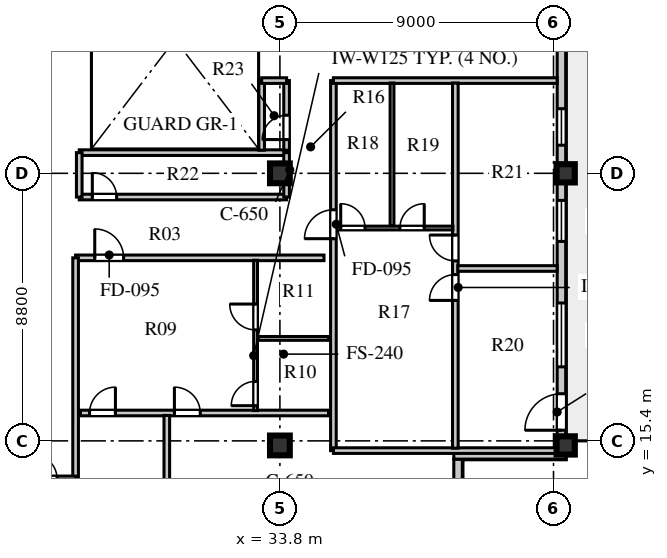
"""IFC4 building model, lengths in metres.
Left out: names, types, materials, properties, quantities, classifications, styles, units other than length and angle.
Written with IfcOpenShell. Run it as: python <this file> out.ifc"""

import sys

from ifc_helpers import new_model, si_unit, direction, frame, frame_2d, origin, origin_2d, place, context, subcontext, project, spatial, rectangle, extrude, element, fill, save


model = new_model("IFC4")
c1 = context("Model", 3, precision=1e-05, world=origin(), true_north=direction((0.0, 1.0)))
c2 = subcontext(c1, "Body", "Model", "MODEL_VIEW")
j1 = project(units=[si_unit("LENGTHUNIT", "METRE"), si_unit("PLANEANGLEUNIT", "RADIAN")], contexts=[c1])
p1 = place(None, origin())
s1 = spatial("IfcSite", under=j1, at=p1, CompositionType="ELEMENT")
p2 = place(p1, origin())
s2 = spatial("IfcBuilding", under=s1, at=p2, CompositionType="ELEMENT")
p3 = place(p2, frame((0.0, 0.0, 335.3)))
s3 = spatial("IfcBuildingStorey", under=s2, at=p3, CompositionType="ELEMENT", Elevation=335.3)
for number, where, z_axis, x_axis in (
    (1, (33.8, 15.25, 0.0), (0.0, 0.0, 1.0), (1.0, 0.0, 0.0)),
    (2, (33.8, 24.2, 0.0), (0.0, 0.0, 1.0), (1.0, 0.0, 0.0)),
):
    element("IfcColumn", number, at=place(p3, frame(where, z_axis=z_axis, x_axis=x_axis)), inside=s3, PredefinedType="COLUMN", context=c2, shape_type="SweptSolid", body=[
        extrude(rectangle(XDim=0.65, YDim=0.65, at=origin_2d()), origin(), (0.0, 0.0, 1.0), 3.56),
    ])
for number, where, z_axis, x_axis in (
    (3, (43.2, 15.25, 0.0), (0.0, 0.0, 1.0), (1.0, 0.0, 0.0)),
    (4, (43.2, 24.2, 0.0), (0.0, 0.0, 1.0), (1.0, 0.0, 0.0)),
):
    element("IfcColumn", number, at=place(p3, frame(where, z_axis=z_axis, x_axis=x_axis)), inside=s3, PredefinedType="COLUMN", context=c2, shape_type="SweptSolid", body=[
        extrude(rectangle(XDim=0.6, YDim=0.6, at=origin_2d()), origin(), (0.0, 0.0, 1.0), 3.56),
    ])
p4 = place(p3, frame((39.66, 11.68, 0.0), z_axis=(0.0, 0.0, 1.0), x_axis=(0.0, 1.0, 0.0)))
e5 = element("IfcWall", 5, at=p4, inside=s3, PredefinedType="STANDARD", context=c2, shape_type="SweptSolid", body=[
    extrude(rectangle(XDim=3.12, YDim=0.28, at=frame_2d((1.56, 0.0))), origin(), (0.0, 0.0, 1.0), 2.92),
])
p5 = place(p3, frame((39.52, 14.94, 0.0), z_axis=(0.0, 0.0, 1.0), x_axis=(1.0, 0.0, 0.0)))
e6 = element("IfcWall", 6, at=p5, inside=s3, PredefinedType="STANDARD", context=c2, shape_type="SweptSolid", body=[
    extrude(rectangle(XDim=3.68, YDim=0.28, at=frame_2d((1.84, 0.0))), origin(), (0.0, 0.0, 1.0), 2.92),
])
p6 = place(p3, frame((43.06, 15.08, 0.0), z_axis=(0.0, 0.0, 1.0), x_axis=(0.0, 1.0, 0.0)))
e7 = element("IfcWall", 7, at=p6, inside=s3, PredefinedType="STANDARD", context=c2, shape_type="SweptSolid", body=[
    extrude(rectangle(XDim=27.04, YDim=0.28, at=frame_2d((13.52, 0.0))), origin(), (0.0, 0.0, 1.0), 2.92),
])
p7 = place(p6, frame((0.67, 0.0, 0.0)))
e8 = element("IfcOpeningElement", 8, at=p7, cuts=e7, PredefinedType="OPENING", context=c2, shape_type="SweptSolid", body=[
    extrude(rectangle(XDim=1.2, YDim=2.05, at=frame_2d((0.6, 1.025))), frame((0.0, 0.15, 0.0), z_axis=(0.0, -1.0, 0.0), x_axis=(1.0, 0.0, 0.0)), (0.0, 0.0, 1.0), 0.3),
])
p8 = place(p6, frame((2.755, 0.0, 0.8)))
e9 = element("IfcOpeningElement", 9, at=p8, cuts=e7, PredefinedType="OPENING", context=c2, shape_type="SweptSolid", body=[
    extrude(rectangle(XDim=2.1, YDim=1.95, at=frame_2d((1.05, 0.975))), frame((0.0, 0.15, 0.0), z_axis=(0.0, -1.0, 0.0), x_axis=(1.0, 0.0, 0.0)), (0.0, 0.0, 1.0), 0.3),
])
p9 = place(p6, frame((6.88, 0.0, 0.8)))
e10 = element("IfcOpeningElement", 10, at=p9, cuts=e7, PredefinedType="OPENING", context=c2, shape_type="SweptSolid", body=[
    extrude(rectangle(XDim=1.35, YDim=1.9, at=frame_2d((0.675, 0.95))), frame((0.0, 0.15, 0.0), z_axis=(0.0, -1.0, 0.0), x_axis=(1.0, 0.0, 0.0)), (0.0, 0.0, 1.0), 0.3),
])
p10 = place(p6, frame((10.045, 0.0, 0.8)))
e11 = element("IfcOpeningElement", 11, at=p10, cuts=e7, PredefinedType="OPENING", context=c2, shape_type="SweptSolid", body=[
    extrude(rectangle(XDim=1.2, YDim=1.75, at=frame_2d((0.6, 0.875))), frame((0.0, 0.15, 0.0), z_axis=(0.0, -1.0, 0.0), x_axis=(1.0, 0.0, 0.0)), (0.0, 0.0, 1.0), 0.3),
])
p11 = place(p6, frame((14.875, 0.0, 0.8)))
e12 = element("IfcOpeningElement", 12, at=p11, cuts=e7, PredefinedType="OPENING", context=c2, shape_type="SweptSolid", body=[
    extrude(rectangle(XDim=1.95, YDim=2.0, at=frame_2d((0.975, 1.0))), frame((0.0, 0.15, 0.0), z_axis=(0.0, -1.0, 0.0), x_axis=(1.0, 0.0, 0.0)), (0.0, 0.0, 1.0), 0.3),
])
p12 = place(p6, frame((21.42, 0.0, 0.8)))
e13 = element("IfcOpeningElement", 13, at=p12, cuts=e7, PredefinedType="OPENING", context=c2, shape_type="SweptSolid", body=[
    extrude(rectangle(XDim=2.25, YDim=2.0, at=frame_2d((1.125, 1.0))), frame((0.0, 0.15, 0.0), z_axis=(0.0, -1.0, 0.0), x_axis=(1.0, 0.0, 0.0)), (0.0, 0.0, 1.0), 0.3),
])
p13 = place(p3, frame((27.08, 21.42, 0.0), z_axis=(0.0, 0.0, 1.0), x_axis=(1.0, 0.0, 0.0)))
e14 = element("IfcWall", 14, at=p13, inside=s3, PredefinedType="SOLIDWALL", context=c2, shape_type="SweptSolid", body=[
    extrude(rectangle(XDim=8.17, YDim=0.185, at=frame_2d((4.085, 0.0))), origin(), (0.0, 0.0, 1.0), 3.26),
])
p14 = place(p13, frame((0.63, 0.0, 0.0)))
e15 = element("IfcOpeningElement", 15, at=p14, cuts=e14, PredefinedType="OPENING", context=c2, shape_type="SweptSolid", body=[
    extrude(rectangle(XDim=0.95, YDim=2.1, at=frame_2d((0.475, 1.05))), frame((0.0, 0.103, 0.0), z_axis=(0.0, -1.0, 0.0), x_axis=(1.0, 0.0, 0.0)), (0.0, 0.0, 1.0), 0.205),
])
p15 = place(p3, frame((27.08, 11.68, 0.0), z_axis=(0.0, 0.0, 1.0), x_axis=(0.0, 1.0, 0.0)))
e16 = element("IfcWall", 16, at=p15, inside=s3, PredefinedType="SOLIDWALL", context=c2, shape_type="SweptSolid", body=[
    extrude(rectangle(XDim=9.74, YDim=0.185, at=frame_2d((4.87, 0.0))), origin(), (0.0, 0.0, 1.0), 3.56),
])
p16 = place(p3, frame((27.24, 16.317, 0.0), z_axis=(0.0, 0.0, 1.0), x_axis=(1.0, 0.0, 0.0)))
e17 = element("IfcWall", 17, at=p16, inside=s3, PredefinedType="SOLIDWALL", context=c2, shape_type="SweptSolid", body=[
    extrude(rectangle(XDim=8.16, YDim=0.185, at=frame_2d((4.08, 0.0))), origin(), (0.0, 0.0, 1.0), 3.56),
])
p17 = place(p16, frame((0.3, 0.0, 0.0)))
e18 = element("IfcOpeningElement", 18, at=p17, cuts=e17, PredefinedType="OPENING", context=c2, shape_type="SweptSolid", body=[
    extrude(rectangle(XDim=0.85, YDim=2.08, at=frame_2d((0.425, 1.04))), frame((0.0, 0.103, 0.0), z_axis=(0.0, -1.0, 0.0), x_axis=(1.0, 0.0, 0.0)), (0.0, 0.0, 1.0), 0.205),
])
p18 = place(p16, frame((3.09, 0.0, 0.0)))
e19 = element("IfcOpeningElement", 19, at=p18, cuts=e17, PredefinedType="OPENING", context=c2, shape_type="SweptSolid", body=[
    extrude(rectangle(XDim=0.85, YDim=2.08, at=frame_2d((0.425, 1.04))), frame((0.0, 0.103, 0.0), z_axis=(0.0, -1.0, 0.0), x_axis=(1.0, 0.0, 0.0)), (0.0, 0.0, 1.0), 0.205),
])
p19 = place(p3, frame((33.0, 16.397, 0.0), z_axis=(0.0, 0.0, 1.0), x_axis=(0.0, 1.0, 0.0)))
e20 = element("IfcWall", 20, at=p19, inside=s3, PredefinedType="PLUMBINGWALL", context=c2, shape_type="SweptSolid", body=[
    extrude(rectangle(XDim=4.943, YDim=0.125, at=frame_2d((2.472, 0.0))), origin(), (0.0, 0.0, 1.0), 3.56),
])
p20 = place(p19, frame((0.16, 0.0, 0.0)))
e21 = element("IfcOpeningElement", 21, at=p20, cuts=e20, PredefinedType="OPENING", context=c2, shape_type="SweptSolid", body=[
    extrude(rectangle(XDim=0.8, YDim=2.05, at=frame_2d((0.4, 1.025))), frame((0.0, 0.073, 0.0), z_axis=(0.0, -1.0, 0.0), x_axis=(1.0, 0.0, 0.0)), (0.0, 0.0, 1.0), 0.145),
])
p21 = place(p19, frame((2.653, 0.0, 0.0)))
e22 = element("IfcOpeningElement", 22, at=p21, cuts=e20, PredefinedType="OPENING", context=c2, shape_type="SweptSolid", body=[
    extrude(rectangle(XDim=0.85, YDim=2.08, at=frame_2d((0.425, 1.04))), frame((0.0, 0.073, 0.0), z_axis=(0.0, -1.0, 0.0), x_axis=(1.0, 0.0, 0.0)), (0.0, 0.0, 1.0), 0.145),
])
p22 = place(p3, frame((33.08, 18.77, 0.0), z_axis=(0.0, 0.0, 1.0), x_axis=(1.0, 0.0, 0.0)))
e23 = element("IfcWall", 23, at=p22, inside=s3, PredefinedType="PLUMBINGWALL", context=c2, shape_type="SweptSolid", body=[
    extrude(rectangle(XDim=2.32, YDim=0.125, at=frame_2d((1.16, 0.0))), origin(), (0.0, 0.0, 1.0), 3.56),
])
p23 = place(p3, frame((30.08, 11.68, 0.0), z_axis=(0.0, 0.0, 1.0), x_axis=(0.0, 1.0, 0.0)))
e24 = element("IfcWall", 24, at=p23, inside=s3, PredefinedType="SOLIDWALL", context=c2, shape_type="SweptSolid", body=[
    extrude(rectangle(XDim=4.557, YDim=0.185, at=frame_2d((2.279, 0.0))), origin(), (0.0, 0.0, 1.0), 3.56),
])
p24 = place(p3, frame((35.56, 15.08, 0.0), z_axis=(0.0, 0.0, 1.0), x_axis=(0.0, 1.0, 0.0)))
e25 = element("IfcWall", 25, at=p24, inside=s3, PredefinedType="SOLIDWALL", context=c2, shape_type="SweptSolid", body=[
    extrude(rectangle(XDim=12.17, YDim=0.185, at=frame_2d((6.085, 0.0))), origin(), (0.0, 0.0, 1.0), 3.56),
])
p25 = place(p24, frame((6.97, 0.0, 0.0)))
e26 = element("IfcOpeningElement", 26, at=p25, cuts=e25, PredefinedType="OPENING", context=c2, shape_type="SweptSolid", body=[
    extrude(rectangle(XDim=0.95, YDim=2.1, at=frame_2d((0.475, 1.05))), frame((0.0, 0.103, 0.0), z_axis=(0.0, -1.0, 0.0), x_axis=(1.0, 0.0, 0.0)), (0.0, 0.0, 1.0), 0.205),
])
p26 = place(p3, frame((35.56, 15.08, 0.0), z_axis=(0.0, 0.0, 1.0), x_axis=(1.0, 0.0, 0.0)))
e27 = element("IfcWall", 27, at=p26, inside=s3, PredefinedType="SOLIDWALL", context=c2, shape_type="SweptSolid", body=[
    extrude(rectangle(XDim=7.36, YDim=0.185, at=frame_2d((3.68, 0.0))), origin(), (0.0, 0.0, 1.0), 3.11),
])
p27 = place(p3, frame((35.56, 27.25, 0.0), z_axis=(0.0, 0.0, 1.0), x_axis=(1.0, 0.0, 0.0)))
e28 = element("IfcWall", 28, at=p27, inside=s3, PredefinedType="SOLIDWALL", context=c2, shape_type="SweptSolid", body=[
    extrude(rectangle(XDim=7.36, YDim=0.185, at=frame_2d((3.68, 0.0))), origin(), (0.0, 0.0, 1.0), 3.56),
])
p28 = place(p3, frame((39.571, 15.16, 0.0), z_axis=(0.0, 0.0, 1.0), x_axis=(0.0, 1.0, 0.0)))
e29 = element("IfcWall", 29, at=p28, inside=s3, PredefinedType="SOLIDWALL", context=c2, shape_type="SweptSolid", body=[
    extrude(rectangle(XDim=12.01, YDim=0.185, at=frame_2d((6.005, 0.0))), origin(), (0.0, 0.0, 1.0), 3.56),
])
p29 = place(p28, frame((4.86, 0.0, 0.0)))
e30 = element("IfcOpeningElement", 30, at=p29, cuts=e29, PredefinedType="OPENING", context=c2, shape_type="SweptSolid", body=[
    extrude(rectangle(XDim=0.85, YDim=2.08, at=frame_2d((0.425, 1.04))), frame((0.0, 0.103, 0.0), z_axis=(0.0, -1.0, 0.0), x_axis=(1.0, 0.0, 0.0)), (0.0, 0.0, 1.0), 0.205),
])
p30 = place(p28, frame((6.16, 0.0, 0.0)))
e31 = element("IfcOpeningElement", 31, at=p30, cuts=e29, PredefinedType="OPENING", context=c2, shape_type="SweptSolid", body=[
    extrude(rectangle(XDim=0.85, YDim=2.08, at=frame_2d((0.425, 1.04))), frame((0.0, 0.103, 0.0), z_axis=(0.0, -1.0, 0.0), x_axis=(1.0, 0.0, 0.0)), (0.0, 0.0, 1.0), 0.205),
])
p31 = place(p3, frame((35.64, 22.4, 0.0), z_axis=(0.0, 0.0, 1.0), x_axis=(1.0, 0.0, 0.0)))
e32 = element("IfcWall", 32, at=p31, inside=s3, PredefinedType="PLUMBINGWALL", context=c2, shape_type="SweptSolid", body=[
    extrude(rectangle(XDim=3.851, YDim=0.125, at=frame_2d((1.926, 0.0))), origin(), (0.0, 0.0, 1.0), 3.56),
])
p32 = place(p31, frame((0.16, 0.0, 0.0)))
e33 = element("IfcOpeningElement", 33, at=p32, cuts=e32, PredefinedType="OPENING", context=c2, shape_type="SweptSolid", body=[
    extrude(rectangle(XDim=0.8, YDim=2.05, at=frame_2d((0.4, 1.025))), frame((0.0, 0.073, 0.0), z_axis=(0.0, -1.0, 0.0), x_axis=(1.0, 0.0, 0.0)), (0.0, 0.0, 1.0), 0.145),
])
p33 = place(p31, frame((2.108, 0.0, 0.0)))
e34 = element("IfcOpeningElement", 34, at=p33, cuts=e32, PredefinedType="OPENING", context=c2, shape_type="SweptSolid", body=[
    extrude(rectangle(XDim=0.8, YDim=2.05, at=frame_2d((0.4, 1.025))), frame((0.0, 0.073, 0.0), z_axis=(0.0, -1.0, 0.0), x_axis=(1.0, 0.0, 0.0)), (0.0, 0.0, 1.0), 0.145),
])
p34 = place(p3, frame((37.488, 22.48, 0.0), z_axis=(0.0, 0.0, 1.0), x_axis=(0.0, 1.0, 0.0)))
e35 = element("IfcWall", 35, at=p34, inside=s3, PredefinedType="PLUMBINGWALL", context=c2, shape_type="SweptSolid", body=[
    extrude(rectangle(XDim=4.69, YDim=0.125, at=frame_2d((2.345, 0.0))), origin(), (0.0, 0.0, 1.0), 3.56),
])
p35 = place(p3, frame((39.651, 21.07, 0.0), z_axis=(0.0, 0.0, 1.0), x_axis=(1.0, 0.0, 0.0)))
e36 = element("IfcWall", 36, at=p35, inside=s3, PredefinedType="SOLIDWALL", context=c2, shape_type="SweptSolid", body=[
    extrude(rectangle(XDim=3.269, YDim=0.185, at=frame_2d((1.635, 0.0))), origin(), (0.0, 0.0, 1.0), 3.56),
])
p36 = place(p3, frame((27.2, 23.42, 0.0), z_axis=(0.0, 0.0, 1.0), x_axis=(1.0, 0.0, 0.0)))
e37 = element("IfcWall", 37, at=p36, inside=s3, PredefinedType="SOLIDWALL", context=c2, shape_type="SweptSolid", body=[
    extrude(rectangle(XDim=6.82, YDim=0.185, at=frame_2d((3.41, 0.0))), origin(), (0.0, 0.0, 1.0), 3.56),
])
p37 = place(p36, frame((0.43, 0.0, 0.0)))
e38 = element("IfcOpeningElement", 38, at=p37, cuts=e37, PredefinedType="OPENING", context=c2, shape_type="SweptSolid", body=[
    extrude(rectangle(XDim=0.8, YDim=2.05, at=frame_2d((0.4, 1.025))), frame((0.0, 0.103, 0.0), z_axis=(0.0, -1.0, 0.0), x_axis=(1.0, 0.0, 0.0)), (0.0, 0.0, 1.0), 0.205),
])
p38 = place(p3, frame((27.2, 24.88, 0.0), z_axis=(0.0, 0.0, 1.0), x_axis=(1.0, 0.0, 0.0)))
e39 = element("IfcWall", 39, at=p38, inside=s3, PredefinedType="SOLIDWALL", context=c2, shape_type="SweptSolid", body=[
    extrude(rectangle(XDim=6.82, YDim=0.185, at=frame_2d((3.41, 0.0))), origin(), (0.0, 0.0, 1.0), 3.01),
])
p39 = place(p3, frame((27.2, 23.42, 0.0), z_axis=(0.0, 0.0, 1.0), x_axis=(0.0, 1.0, 0.0)))
e40 = element("IfcWall", 40, at=p39, inside=s3, PredefinedType="SOLIDWALL", context=c2, shape_type="SweptSolid", body=[
    extrude(rectangle(XDim=1.46, YDim=0.185, at=frame_2d((0.73, 0.0))), origin(), (0.0, 0.0, 1.0), 3.56),
])
p40 = place(p3, frame((34.02, 23.42, 0.0), z_axis=(0.0, 0.0, 1.0), x_axis=(0.0, 1.0, 0.0)))
e41 = element("IfcWall", 41, at=p40, inside=s3, PredefinedType="SOLIDWALL", context=c2, shape_type="SweptSolid", body=[
    extrude(rectangle(XDim=1.46, YDim=0.185, at=frame_2d((0.73, 0.0))), origin(), (0.0, 0.0, 1.0), 2.96),
])
p41 = place(p3, frame((33.2, 24.96, 0.0), z_axis=(0.0, 0.0, 1.0), x_axis=(0.0, 1.0, 0.0)))
e42 = element("IfcWall", 42, at=p41, inside=s3, PredefinedType="SOLIDWALL", context=c2, shape_type="SweptSolid", body=[
    extrude(rectangle(XDim=2.29, YDim=0.185, at=frame_2d((1.145, 0.0))), origin(), (0.0, 0.0, 1.0), 3.01),
])
p42 = place(p3, frame((34.02, 24.96, 0.0), z_axis=(0.0, 0.0, 1.0), x_axis=(0.0, 1.0, 0.0)))
e43 = element("IfcWall", 43, at=p42, inside=s3, PredefinedType="SOLIDWALL", context=c2, shape_type="SweptSolid", body=[
    extrude(rectangle(XDim=2.29, YDim=0.185, at=frame_2d((1.145, 0.0))), origin(), (0.0, 0.0, 1.0), 2.96),
])
p43 = place(p42, frame((0.35, 0.0, 0.0)))
e44 = element("IfcOpeningElement", 44, at=p43, cuts=e43, PredefinedType="OPENING", context=c2, shape_type="SweptSolid", body=[
    extrude(rectangle(XDim=0.8, YDim=2.05, at=frame_2d((0.4, 1.025))), frame((0.0, 0.103, 0.0), z_axis=(0.0, -1.0, 0.0), x_axis=(1.0, 0.0, 0.0)), (0.0, 0.0, 1.0), 0.205),
])
p44 = place(p3, frame((33.2, 27.25, 0.0), z_axis=(0.0, 0.0, 1.0), x_axis=(1.0, 0.0, 0.0)))
e45 = element("IfcWall", 45, at=p44, inside=s3, PredefinedType="SOLIDWALL", context=c2, shape_type="SweptSolid", body=[
    extrude(rectangle(XDim=0.82, YDim=0.185, at=frame_2d((0.41, 0.0))), origin(), (0.0, 0.0, 1.0), 3.56),
])
p45 = place(p3, frame((25.22, 14.15, 0.0), z_axis=(0.0, 0.0, 1.0), x_axis=(1.0, 0.0, 0.0)))
e46 = element("IfcWall", 46, at=p45, inside=s3, PredefinedType="SOLIDWALL", context=c2, shape_type="SweptSolid", body=[
    extrude(rectangle(XDim=1.86, YDim=0.185, at=frame_2d((0.93, 0.0))), origin(), (0.0, 0.0, 1.0), 3.56),
])
p46 = place(p45, frame((0.45, 0.0, 0.0)))
e47 = element("IfcOpeningElement", 47, at=p46, cuts=e46, PredefinedType="OPENING", context=c2, shape_type="SweptSolid", body=[
    extrude(rectangle(XDim=0.8, YDim=2.05, at=frame_2d((0.4, 1.025))), frame((0.0, 0.103, 0.0), z_axis=(0.0, -1.0, 0.0), x_axis=(1.0, 0.0, 0.0)), (0.0, 0.0, 1.0), 0.205),
])
p47 = place(p7, frame((1.2, 0.0, 0.0), z_axis=(0.0, 0.0, 1.0), x_axis=(-1.0, 0.0, 0.0)))
e48 = element("IfcDoor", 48, at=p47, inside=s3, OperationType="SINGLE_SWING_RIGHT", PredefinedType="DOOR", context=c2, shape_type="SweptSolid", body=[
    extrude(rectangle(XDim=1.2, YDim=2.05, at=frame_2d((0.6, 1.025))), frame((0.0, 0.025, 0.0), z_axis=(0.0, -1.0, 0.0), x_axis=(1.0, 0.0, 0.0)), (0.0, 0.0, 1.0), 0.05),
])
fill(e8, e48)
p48 = place(p8, origin())
e49 = element("IfcWindow", 49, at=p48, inside=s3, PartitioningType="SINGLE_PANEL", PredefinedType="WINDOW", context=c2, shape_type="SweptSolid", body=[
    extrude(rectangle(XDim=2.1, YDim=1.95, at=frame_2d((1.05, 0.975))), frame((0.0, 0.03, 0.0), z_axis=(0.0, -1.0, 0.0), x_axis=(1.0, 0.0, 0.0)), (0.0, 0.0, 1.0), 0.06),
])
fill(e9, e49)
p49 = place(p9, origin())
e50 = element("IfcWindow", 50, at=p49, inside=s3, PartitioningType="SINGLE_PANEL", PredefinedType="WINDOW", context=c2, shape_type="SweptSolid", body=[
    extrude(rectangle(XDim=1.35, YDim=1.9, at=frame_2d((0.675, 0.95))), frame((0.0, 0.03, 0.0), z_axis=(0.0, -1.0, 0.0), x_axis=(1.0, 0.0, 0.0)), (0.0, 0.0, 1.0), 0.06),
])
fill(e10, e50)
p50 = place(p10, origin())
e51 = element("IfcWindow", 51, at=p50, inside=s3, PartitioningType="SINGLE_PANEL", PredefinedType="WINDOW", context=c2, shape_type="SweptSolid", body=[
    extrude(rectangle(XDim=1.2, YDim=1.75, at=frame_2d((0.6, 0.875))), frame((0.0, 0.03, 0.0), z_axis=(0.0, -1.0, 0.0), x_axis=(1.0, 0.0, 0.0)), (0.0, 0.0, 1.0), 0.06),
])
fill(e11, e51)
p51 = place(p20, origin())
e52 = element("IfcDoor", 52, at=p51, inside=s3, OperationType="SINGLE_SWING_LEFT", PredefinedType="DOOR", context=c2, shape_type="SweptSolid", body=[
    extrude(rectangle(XDim=0.8, YDim=2.05, at=frame_2d((0.4, 1.025))), frame((0.0, 0.025, 0.0), z_axis=(0.0, -1.0, 0.0), x_axis=(1.0, 0.0, 0.0)), (0.0, 0.0, 1.0), 0.05),
])
fill(e21, e52)
p52 = place(p21, origin())
e53 = element("IfcDoor", 53, at=p52, inside=s3, OperationType="SINGLE_SWING_RIGHT", PredefinedType="DOOR", context=c2, shape_type="SweptSolid", body=[
    extrude(rectangle(XDim=0.85, YDim=2.08, at=frame_2d((0.425, 1.04))), frame((0.0, 0.025, 0.0), z_axis=(0.0, -1.0, 0.0), x_axis=(1.0, 0.0, 0.0)), (0.0, 0.0, 1.0), 0.05),
])
fill(e22, e53)
p53 = place(p17, frame((0.85, 0.0, 0.0), z_axis=(0.0, 0.0, 1.0), x_axis=(-1.0, 0.0, 0.0)))
e54 = element("IfcDoor", 54, at=p53, inside=s3, OperationType="SINGLE_SWING_LEFT", PredefinedType="DOOR", context=c2, shape_type="SweptSolid", body=[
    extrude(rectangle(XDim=0.85, YDim=2.08, at=frame_2d((0.425, 1.04))), frame((0.0, 0.025, 0.0), z_axis=(0.0, -1.0, 0.0), x_axis=(1.0, 0.0, 0.0)), (0.0, 0.0, 1.0), 0.05),
])
fill(e18, e54)
p54 = place(p18, frame((0.85, 0.0, 0.0), z_axis=(0.0, 0.0, 1.0), x_axis=(-1.0, 0.0, 0.0)))
e55 = element("IfcDoor", 55, at=p54, inside=s3, OperationType="SINGLE_SWING_RIGHT", PredefinedType="DOOR", context=c2, shape_type="SweptSolid", body=[
    extrude(rectangle(XDim=0.85, YDim=2.08, at=frame_2d((0.425, 1.04))), frame((0.0, 0.025, 0.0), z_axis=(0.0, -1.0, 0.0), x_axis=(1.0, 0.0, 0.0)), (0.0, 0.0, 1.0), 0.05),
])
fill(e19, e55)
p55 = place(p14, frame((0.95, 0.0, 0.0), z_axis=(0.0, 0.0, 1.0), x_axis=(-1.0, 0.0, 0.0)))
e56 = element("IfcDoor", 56, at=p55, inside=s3, OperationType="SINGLE_SWING_RIGHT", PredefinedType="DOOR", context=c2, shape_type="SweptSolid", body=[
    extrude(rectangle(XDim=0.95, YDim=2.1, at=frame_2d((0.475, 1.05))), frame((0.0, 0.025, 0.0), z_axis=(0.0, -1.0, 0.0), x_axis=(1.0, 0.0, 0.0)), (0.0, 0.0, 1.0), 0.05),
])
fill(e15, e56)
p56 = place(p32, origin())
e57 = element("IfcDoor", 57, at=p56, inside=s3, OperationType="SINGLE_SWING_LEFT", PredefinedType="DOOR", context=c2, shape_type="SweptSolid", body=[
    extrude(rectangle(XDim=0.8, YDim=2.05, at=frame_2d((0.4, 1.025))), frame((0.0, 0.025, 0.0), z_axis=(0.0, -1.0, 0.0), x_axis=(1.0, 0.0, 0.0)), (0.0, 0.0, 1.0), 0.05),
])
fill(e33, e57)
p57 = place(p33, origin())
e58 = element("IfcDoor", 58, at=p57, inside=s3, OperationType="SINGLE_SWING_RIGHT", PredefinedType="DOOR", context=c2, shape_type="SweptSolid", body=[
    extrude(rectangle(XDim=0.8, YDim=2.05, at=frame_2d((0.4, 1.025))), frame((0.0, 0.025, 0.0), z_axis=(0.0, -1.0, 0.0), x_axis=(1.0, 0.0, 0.0)), (0.0, 0.0, 1.0), 0.05),
])
fill(e34, e58)
p58 = place(p29, origin())
e59 = element("IfcDoor", 59, at=p58, inside=s3, OperationType="SINGLE_SWING_LEFT", PredefinedType="DOOR", context=c2, shape_type="SweptSolid", body=[
    extrude(rectangle(XDim=0.85, YDim=2.08, at=frame_2d((0.425, 1.04))), frame((0.0, 0.025, 0.0), z_axis=(0.0, -1.0, 0.0), x_axis=(1.0, 0.0, 0.0)), (0.0, 0.0, 1.0), 0.05),
])
fill(e30, e59)
p59 = place(p30, origin())
e60 = element("IfcDoor", 60, at=p59, inside=s3, OperationType="SINGLE_SWING_RIGHT", PredefinedType="DOOR", context=c2, shape_type="SweptSolid", body=[
    extrude(rectangle(XDim=0.85, YDim=2.08, at=frame_2d((0.425, 1.04))), frame((0.0, 0.025, 0.0), z_axis=(0.0, -1.0, 0.0), x_axis=(1.0, 0.0, 0.0)), (0.0, 0.0, 1.0), 0.05),
])
fill(e31, e60)
p60 = place(p25, origin())
e61 = element("IfcDoor", 61, at=p60, inside=s3, OperationType="SINGLE_SWING_LEFT", PredefinedType="DOOR", context=c2, shape_type="SweptSolid", body=[
    extrude(rectangle(XDim=0.95, YDim=2.1, at=frame_2d((0.475, 1.05))), frame((0.0, 0.025, 0.0), z_axis=(0.0, -1.0, 0.0), x_axis=(1.0, 0.0, 0.0)), (0.0, 0.0, 1.0), 0.05),
])
fill(e26, e61)
p61 = place(p37, origin())
e62 = element("IfcDoor", 62, at=p61, inside=s3, OperationType="SINGLE_SWING_LEFT", PredefinedType="DOOR", context=c2, shape_type="SweptSolid", body=[
    extrude(rectangle(XDim=0.8, YDim=2.05, at=frame_2d((0.4, 1.025))), frame((0.0, 0.025, 0.0), z_axis=(0.0, -1.0, 0.0), x_axis=(1.0, 0.0, 0.0)), (0.0, 0.0, 1.0), 0.05),
])
fill(e38, e62)
p62 = place(p43, origin())
e63 = element("IfcDoor", 63, at=p62, inside=s3, OperationType="SINGLE_SWING_LEFT", PredefinedType="DOOR", context=c2, shape_type="SweptSolid", body=[
    extrude(rectangle(XDim=0.8, YDim=2.05, at=frame_2d((0.4, 1.025))), frame((0.0, 0.025, 0.0), z_axis=(0.0, -1.0, 0.0), x_axis=(1.0, 0.0, 0.0)), (0.0, 0.0, 1.0), 0.05),
])
fill(e44, e63)
p63 = place(p46, origin())
e64 = element("IfcDoor", 64, at=p63, inside=s3, OperationType="SINGLE_SWING_LEFT", PredefinedType="DOOR", context=c2, shape_type="SweptSolid", body=[
    extrude(rectangle(XDim=0.8, YDim=2.05, at=frame_2d((0.4, 1.025))), frame((0.0, 0.025, 0.0), z_axis=(0.0, -1.0, 0.0), x_axis=(1.0, 0.0, 0.0)), (0.0, 0.0, 1.0), 0.05),
])
fill(e47, e64)
save(model, sys.argv[1])
